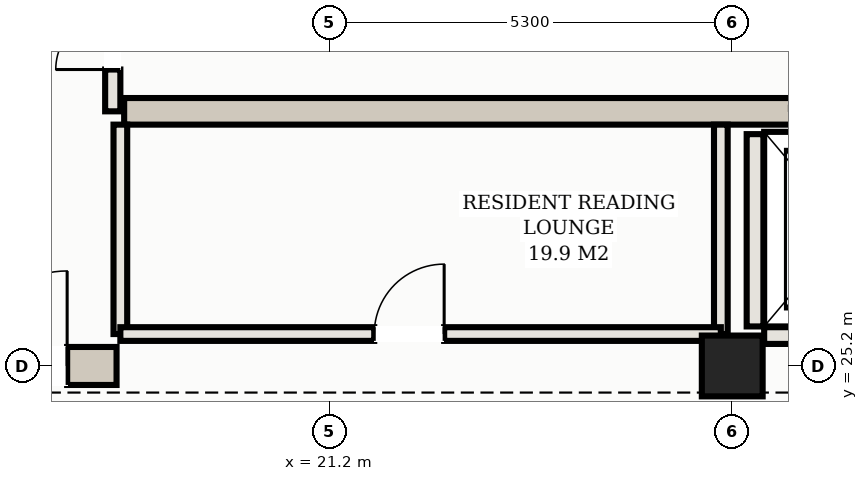
"""IFC4 building model, lengths in metres.
Left out: names, types, materials, properties, quantities, classifications, styles, units other than length and angle.
Written with IfcOpenShell. Run it as: python <this file> out.ifc"""

import sys

from ifc_helpers import new_model, si_unit, direction, frame, frame_2d, origin, origin_2d, place, context, subcontext, project, spatial, rectangle, hollow_rectangle, extrude, element, fill, save


model = new_model("IFC4")
c1 = context("Model", 3, precision=1e-05, world=origin(), true_north=direction((0.0, 1.0)))
c2 = subcontext(c1, "Body", "Model", "MODEL_VIEW")
j1 = project(units=[si_unit("LENGTHUNIT", "METRE"), si_unit("PLANEANGLEUNIT", "RADIAN")], contexts=[c1])
p1 = place(None, origin())
s1 = spatial("IfcSite", under=j1, at=p1, CompositionType="ELEMENT")
p2 = place(p1, origin())
s2 = spatial("IfcBuilding", under=s1, at=p2, CompositionType="ELEMENT")
p3 = place(p2, frame((0.0, 0.0, 192.2)))
s3 = spatial("IfcBuildingStorey", under=s2, at=p3, CompositionType="ELEMENT", Elevation=192.2)
p4 = place(p3, frame((10.35, 25.2, 0.0), z_axis=(0.0, 0.0, 1.0), x_axis=(1.0, 0.0, 0.0)))
e1 = element("IfcWall", 1, at=p4, inside=s3, PredefinedType="SHEAR", context=c2, shape_type="SweptSolid", body=[
    extrude(rectangle(XDim=8.05, YDim=0.5, at=frame_2d((4.025, 0.0))), origin(), (0.0, 0.0, 1.0), 4.31),
])
p5 = place(p4, frame((6.15, 0.0, 0.0)))
e2 = element("IfcOpeningElement", 2, at=p5, cuts=e1, PredefinedType="OPENING", context=c2, shape_type="SweptSolid", body=[
    extrude(rectangle(XDim=1.25, YDim=2.2, at=frame_2d((0.625, 1.1))), frame((0.0, 0.26, 0.0), z_axis=(0.0, -1.0, 0.0), x_axis=(1.0, 0.0, 0.0)), (0.0, 0.0, 1.0), 0.52),
])
p6 = place(p3, frame((18.5, 28.55, 0.0), z_axis=(0.0, 0.0, 1.0), x_axis=(1.0, 0.0, 0.0)))
e3 = element("IfcWall", 3, at=p6, inside=s3, PredefinedType="SHEAR", context=c2, shape_type="SweptSolid", body=[
    extrude(rectangle(XDim=16.0, YDim=0.35, at=frame_2d((8.0, 0.0))), origin(), (0.0, 0.0, 1.0), 4.31),
])
p7 = place(p6, frame((8.95, 0.0, 0.0)))
e4 = element("IfcOpeningElement", 4, at=p7, cuts=e3, PredefinedType="OPENING", context=c2, shape_type="SweptSolid", body=[
    extrude(rectangle(XDim=1.1, YDim=2.15, at=frame_2d((0.55, 1.075))), frame((0.0, 0.185, 0.0), z_axis=(0.0, -1.0, 0.0), x_axis=(1.0, 0.0, 0.0)), (0.0, 0.0, 1.0), 0.37),
])
p8 = place(p6, frame((11.55, 0.0, 0.0)))
e5 = element("IfcOpeningElement", 5, at=p8, cuts=e3, PredefinedType="OPENING", context=c2, shape_type="SweptSolid", body=[
    extrude(rectangle(XDim=1.1, YDim=2.15, at=frame_2d((0.55, 1.075))), frame((0.0, 0.185, 0.0), z_axis=(0.0, -1.0, 0.0), x_axis=(1.0, 0.0, 0.0)), (0.0, 0.0, 1.0), 0.37),
])
p9 = place(p6, frame((14.15, 0.0, 0.0)))
e6 = element("IfcOpeningElement", 6, at=p9, cuts=e3, PredefinedType="OPENING", context=c2, shape_type="SweptSolid", body=[
    extrude(rectangle(XDim=1.1, YDim=2.15, at=frame_2d((0.55, 1.075))), frame((0.0, 0.185, 0.0), z_axis=(0.0, -1.0, 0.0), x_axis=(1.0, 0.0, 0.0)), (0.0, 0.0, 1.0), 0.37),
])
p10 = place(p3, frame((26.5, 25.2, 0.0), z_axis=(0.0, 0.0, 1.0), x_axis=(1.0, 0.0, 0.0)))
e7 = element("IfcColumn", 7, at=p10, inside=s3, PredefinedType="COLUMN", context=c2, shape_type="SweptSolid", body=[
    extrude(hollow_rectangle(XDim=0.8, YDim=0.8, WallThickness=0.028, at=origin_2d()), origin(), (0.0, 0.0, 1.0), 4.5),
])
p11 = place(p3, frame((26.8, 25.72, 0.0), z_axis=(0.0, 0.0, 1.0), x_axis=(0.0, 1.0, 0.0)))
e8 = element("IfcWall", 8, at=p11, inside=s3, PredefinedType="SOLIDWALL", context=c2, shape_type="SweptSolid", body=[
    extrude(rectangle(XDim=2.53, YDim=0.22, at=frame_2d((1.265, 0.0))), origin(), (0.0, 0.0, 1.0), 4.31),
])
p12 = place(p3, frame((26.92, 25.6, 0.0), z_axis=(0.0, 0.0, 1.0), x_axis=(1.0, 0.0, 0.0)))
e9 = element("IfcWall", 9, at=p12, inside=s3, PredefinedType="SOLIDWALL", context=c2, shape_type="SweptSolid", body=[
    extrude(rectangle(XDim=2.16, YDim=0.22, at=frame_2d((1.08, 0.0))), origin(), (0.0, 0.0, 1.0), 3.505),
])
p13 = place(p3, frame((18.35, 28.55, 0.0), z_axis=(0.0, 0.0, 1.0), x_axis=(0.0, 1.0, 0.0)))
e10 = element("IfcWall", 10, at=p13, inside=s3, PredefinedType="PARTITIONING", context=c2, shape_type="SweptSolid", body=[
    extrude(rectangle(XDim=2.6, YDim=0.2, at=frame_2d((1.3, 0.0))), origin(), (0.0, 0.0, 1.0), 4.31),
])
p14 = place(p13, frame((0.55, 0.0, 0.0)))
e11 = element("IfcOpeningElement", 11, at=p14, cuts=e10, PredefinedType="OPENING", context=c2, shape_type="SweptSolid", body=[
    extrude(rectangle(XDim=1.5, YDim=2.25, at=frame_2d((0.75, 1.125))), frame((0.0, 0.11, 0.0), z_axis=(0.0, -1.0, 0.0), x_axis=(1.0, 0.0, 0.0)), (0.0, 0.0, 1.0), 0.22),
])
for number, where, z_axis, x_axis in (
    (12, (18.45, 25.62, 0.0), (0.0, 0.0, 1.0), (0.0, 1.0, 0.0)),
    (13, (26.35, 25.62, 0.0), (0.0, 0.0, 1.0), (0.0, 1.0, 0.0)),
):
    element("IfcWall", number, at=place(p3, frame(where, z_axis=z_axis, x_axis=x_axis)), inside=s3, PredefinedType="PARTITIONING", context=c2, shape_type="SweptSolid", body=[
        extrude(rectangle(XDim=2.755, YDim=0.18, at=frame_2d((1.377, 0.0))), origin(), (0.0, 0.0, 1.0), 4.31),
    ])
p15 = place(p3, frame((18.45, 25.62, 0.0), z_axis=(0.0, 0.0, 1.0), x_axis=(1.0, 0.0, 0.0)))
e14 = element("IfcWall", 14, at=p15, inside=s3, PredefinedType="PARTITIONING", context=c2, shape_type="SweptSolid", body=[
    extrude(rectangle(XDim=7.9, YDim=0.18, at=frame_2d((3.95, 0.0))), origin(), (0.0, 0.0, 1.0), 4.31),
])
p16 = place(p15, frame((3.34, 0.0, 0.0)))
e15 = element("IfcOpeningElement", 15, at=p16, cuts=e14, PredefinedType="OPENING", context=c2, shape_type="SweptSolid", body=[
    extrude(rectangle(XDim=0.92, YDim=2.15, at=frame_2d((0.46, 1.075))), frame((0.0, 0.1, 0.0), z_axis=(0.0, -1.0, 0.0), x_axis=(1.0, 0.0, 0.0)), (0.0, 0.0, 1.0), 0.2),
])
p17 = place(p5, origin())
e16 = element("IfcDoor", 16, at=p17, inside=s3, OperationType="SINGLE_SWING_RIGHT", PredefinedType="DOOR", context=c2, shape_type="SweptSolid", body=[
    extrude(rectangle(XDim=1.25, YDim=2.2, at=frame_2d((0.625, 1.1))), frame((0.0, 0.025, 0.0), z_axis=(0.0, -1.0, 0.0), x_axis=(1.0, 0.0, 0.0)), (0.0, 0.0, 1.0), 0.05),
])
fill(e2, e16)
p18 = place(p14, origin())
e17 = element("IfcDoor", 17, at=p18, inside=s3, OperationType="DOUBLE_DOOR_SINGLE_SWING", PredefinedType="DOOR", context=c2, shape_type="SweptSolid", body=[
    extrude(rectangle(XDim=1.5, YDim=2.25, at=frame_2d((0.75, 1.125))), frame((0.0, 0.025, 0.0), z_axis=(0.0, -1.0, 0.0), x_axis=(1.0, 0.0, 0.0)), (0.0, 0.0, 1.0), 0.05),
])
fill(e11, e17)
p19 = place(p16, origin())
e18 = element("IfcDoor", 18, at=p19, inside=s3, OperationType="SINGLE_SWING_RIGHT", PredefinedType="DOOR", context=c2, shape_type="SweptSolid", body=[
    extrude(rectangle(XDim=0.92, YDim=2.15, at=frame_2d((0.46, 1.075))), frame((0.0, 0.025, 0.0), z_axis=(0.0, -1.0, 0.0), x_axis=(1.0, 0.0, 0.0)), (0.0, 0.0, 1.0), 0.05),
])
fill(e15, e18)
save(model, sys.argv[1])
